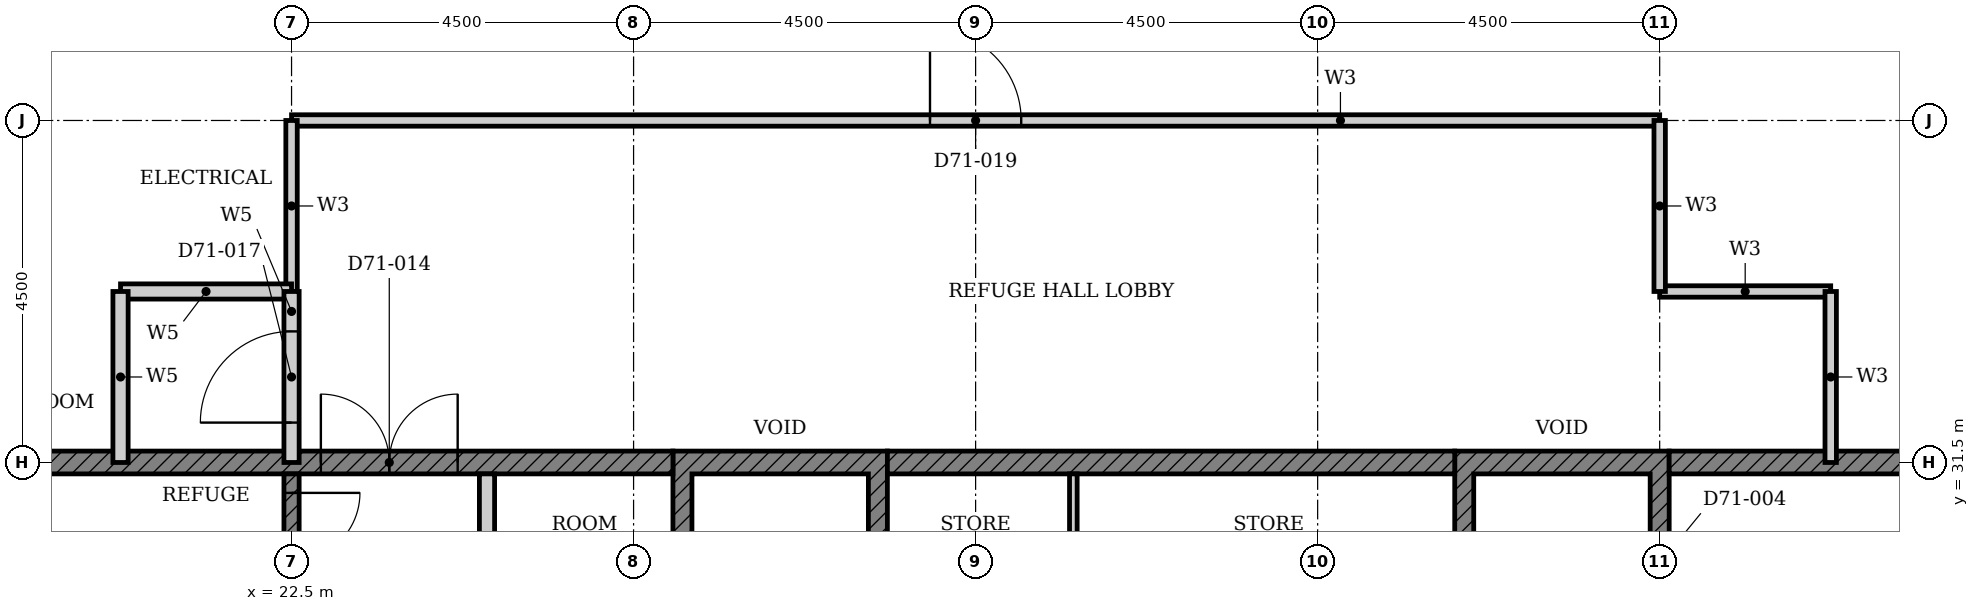
"""IFC4 building model, lengths in metres.
Left out: names, types, materials, properties, quantities, classifications, styles, units other than length and angle.
Written with IfcOpenShell. Run it as: python <this file> out.ifc"""

import sys

from ifc_helpers import new_model, si_unit, direction, frame, frame_2d, origin, place, context, subcontext, project, spatial, polyline, rectangle, outline, extrude, element, fill, save


model = new_model("IFC4")
c1 = context("Model", 3, precision=1e-05, world=origin(), true_north=direction((0.0, 1.0)))
c2 = subcontext(c1, "Body", "Model", "MODEL_VIEW")
j1 = project(units=[si_unit("LENGTHUNIT", "METRE"), si_unit("PLANEANGLEUNIT", "RADIAN")], contexts=[c1])
p1 = place(None, origin())
s1 = spatial("IfcSite", under=j1, at=p1, CompositionType="ELEMENT")
p2 = place(p1, origin())
s2 = spatial("IfcBuilding", under=s1, at=p2, CompositionType="ELEMENT")
p3 = place(p2, frame((0.0, 0.0, 278.6)))
s3 = spatial("IfcBuildingStorey", under=s2, at=p3, CompositionType="ELEMENT", Elevation=278.6)
p4 = place(p3, origin())
e1 = element("IfcWall", 1, at=p4, inside=s3, PredefinedType="SHEAR", context=c2, shape_type="SweptSolid", body=[
    extrude(outline(polyline([(27.518, 28.725), (27.768, 28.725), (27.768, 31.35), (30.089, 31.35), (30.089, 28.725), (30.339, 28.725), (30.339, 31.65), (27.518, 31.65), (27.518, 28.725)])), origin(), (0.0, 0.0, 1.0), 4.5),
])
p5 = place(p3, origin())
e2 = element("IfcWall", 2, at=p5, inside=s3, PredefinedType="SHEAR", context=c2, shape_type="SweptSolid", body=[
    extrude(outline(polyline([(37.803, 28.725), (38.053, 28.725), (38.053, 31.35), (40.375, 31.35), (40.375, 28.725), (40.625, 28.725), (40.625, 31.65), (37.803, 31.65), (37.803, 28.725)])), origin(), (0.0, 0.0, 1.0), 4.5),
])
p6 = place(p3, frame((18.15, 31.5, 0.0), z_axis=(0.0, 0.0, 1.0), x_axis=(1.0, 0.0, 0.0)))
e3 = element("IfcWall", 3, at=p6, inside=s3, PredefinedType="SHEAR", context=c2, shape_type="SweptSolid", body=[
    extrude(rectangle(XDim=9.368, YDim=0.3, at=frame_2d((4.684, 0.0))), origin(), (0.0, 0.0, 1.0), 4.5),
])
p7 = place(p6, frame((4.736, 0.0, 0.0)))
e4 = element("IfcOpeningElement", 4, at=p7, cuts=e3, PredefinedType="OPENING", context=c2, shape_type="SweptSolid", body=[
    extrude(rectangle(XDim=1.8, YDim=2.1, at=frame_2d((0.9, 1.05))), frame((0.0, 0.16, 0.0), z_axis=(0.0, -1.0, 0.0), x_axis=(1.0, 0.0, 0.0)), (0.0, 0.0, 1.0), 0.32),
])
p8 = place(p3, frame((30.339, 31.5, 0.0), z_axis=(0.0, 0.0, 1.0), x_axis=(1.0, 0.0, 0.0)))
e5 = element("IfcWall", 5, at=p8, inside=s3, PredefinedType="SHEAR", context=c2, shape_type="SweptSolid", body=[
    extrude(rectangle(XDim=7.464, YDim=0.3, at=frame_2d((3.732, 0.0))), origin(), (0.0, 0.0, 1.0), 4.5),
])
p9 = place(p3, frame((40.625, 31.5, 0.0), z_axis=(0.0, 0.0, 1.0), x_axis=(1.0, 0.0, 0.0)))
e6 = element("IfcWall", 6, at=p9, inside=s3, PredefinedType="SHEAR", context=c2, shape_type="SweptSolid", body=[
    extrude(rectangle(XDim=4.225, YDim=0.3, at=frame_2d((2.113, 0.0))), origin(), (0.0, 0.0, 1.0), 4.5),
])
p10 = place(p3, frame((25.072, 28.725, 0.0), z_axis=(0.0, 0.0, 1.0), x_axis=(0.0, 1.0, 0.0)))
e7 = element("IfcWall", 7, at=p10, inside=s3, PredefinedType="PARTITIONING", context=c2, shape_type="SweptSolid", body=[
    extrude(rectangle(XDim=2.625, YDim=0.2, at=frame_2d((1.312, 0.0))), origin(), (0.0, 0.0, 1.0), 4.5),
])
p11 = place(p3, frame((32.786, 28.725, 0.0), z_axis=(0.0, 0.0, 1.0), x_axis=(0.0, 1.0, 0.0)))
e8 = element("IfcWall", 8, at=p11, inside=s3, PredefinedType="PARTITIONING", context=c2, shape_type="SweptSolid", body=[
    extrude(rectangle(XDim=2.625, YDim=0.1, at=frame_2d((1.312, 0.0))), origin(), (0.0, 0.0, 1.0), 4.5),
])
p12 = place(p3, frame((22.5, 31.35, 0.0), z_axis=(0.0, 0.0, 1.0), x_axis=(0.0, -1.0, 0.0)))
e9 = element("IfcWall", 9, at=p12, inside=s3, PredefinedType="SHEAR", context=c2, shape_type="SweptSolid", body=[
    extrude(rectangle(XDim=5.825, YDim=0.2, at=frame_2d((2.913, 0.0))), origin(), (0.0, 0.0, 1.0), 4.5),
])
p13 = place(p12, frame((0.25, 0.0, 0.0)))
e10 = element("IfcOpeningElement", 10, at=p13, cuts=e9, PredefinedType="OPENING", context=c2, shape_type="SweptSolid", body=[
    extrude(rectangle(XDim=1.8, YDim=2.1, at=frame_2d((0.9, 1.05))), frame((0.0, 0.11, 0.0), z_axis=(0.0, -1.0, 0.0), x_axis=(1.0, 0.0, 0.0)), (0.0, 0.0, 1.0), 0.22),
])
p14 = place(p3, frame((40.5, 33.75, 0.0), z_axis=(0.0, 0.0, 1.0), x_axis=(1.0, 0.0, 0.0)))
e11 = element("IfcWall", 11, at=p14, inside=s3, PredefinedType="PARTITIONING", context=c2, shape_type="SweptSolid", body=[
    extrude(rectangle(XDim=2.25, YDim=0.15, at=frame_2d((1.125, 0.0))), origin(), (0.0, 0.0, 1.0), 4.5),
])
p15 = place(p3, frame((22.5, 36.0, 0.0), z_axis=(0.0, 0.0, 1.0), x_axis=(1.0, 0.0, 0.0)))
e12 = element("IfcWall", 12, at=p15, inside=s3, PredefinedType="PARTITIONING", context=c2, shape_type="SweptSolid", body=[
    extrude(rectangle(XDim=18.0, YDim=0.15, at=frame_2d((9.0, 0.0))), origin(), (0.0, 0.0, 1.0), 4.5),
])
p16 = place(p15, frame((8.4, 0.0, 0.0)))
e13 = element("IfcOpeningElement", 13, at=p16, cuts=e12, PredefinedType="OPENING", context=c2, shape_type="SweptSolid", body=[
    extrude(rectangle(XDim=1.2, YDim=2.1, at=frame_2d((0.6, 1.05))), frame((0.0, 0.085, 0.0), z_axis=(0.0, -1.0, 0.0), x_axis=(1.0, 0.0, 0.0)), (0.0, 0.0, 1.0), 0.17),
])
for number, where, z_axis, x_axis in (
    (14, (22.5, 33.75, 0.0), (0.0, 0.0, 1.0), (0.0, 1.0, 0.0)),
    (15, (40.5, 33.75, 0.0), (0.0, 0.0, 1.0), (0.0, 1.0, 0.0)),
    (16, (42.75, 31.5, 0.0), (0.0, 0.0, 1.0), (0.0, 1.0, 0.0)),
):
    element("IfcWall", number, at=place(p3, frame(where, z_axis=z_axis, x_axis=x_axis)), inside=s3, PredefinedType="PARTITIONING", context=c2, shape_type="SweptSolid", body=[
        extrude(rectangle(XDim=2.25, YDim=0.15, at=frame_2d((1.125, 0.0))), origin(), (0.0, 0.0, 1.0), 4.5),
    ])
for number, where, z_axis, x_axis in (
    (17, (20.25, 33.75, 0.0), (0.0, 0.0, 1.0), (1.0, 0.0, 0.0)),
    (18, (20.25, 31.5, 0.0), (0.0, 0.0, 1.0), (0.0, 1.0, 0.0)),
):
    element("IfcWall", number, at=place(p3, frame(where, z_axis=z_axis, x_axis=x_axis)), inside=s3, PredefinedType="PARTITIONING", context=c2, shape_type="SweptSolid", body=[
        extrude(rectangle(XDim=2.25, YDim=0.2, at=frame_2d((1.125, 0.0))), origin(), (0.0, 0.0, 1.0), 4.5),
    ])
p17 = place(p3, frame((22.5, 31.5, 0.0), z_axis=(0.0, 0.0, 1.0), x_axis=(0.0, 1.0, 0.0)))
e19 = element("IfcWall", 19, at=p17, inside=s3, PredefinedType="PARTITIONING", context=c2, shape_type="SweptSolid", body=[
    extrude(rectangle(XDim=2.25, YDim=0.2, at=frame_2d((1.125, 0.0))), origin(), (0.0, 0.0, 1.0), 4.5),
])
p18 = place(p17, frame((0.525, 0.0, 0.0)))
e20 = element("IfcOpeningElement", 20, at=p18, cuts=e19, PredefinedType="OPENING", context=c2, shape_type="SweptSolid", body=[
    extrude(rectangle(XDim=1.2, YDim=2.1, at=frame_2d((0.6, 1.05))), frame((0.0, 0.11, 0.0), z_axis=(0.0, -1.0, 0.0), x_axis=(1.0, 0.0, 0.0)), (0.0, 0.0, 1.0), 0.22),
])
p19 = place(p13, origin())
e21 = element("IfcDoor", 21, at=p19, inside=s3, OperationType="DOUBLE_DOOR_SINGLE_SWING", PredefinedType="DOOR", context=c2, shape_type="SweptSolid", body=[
    extrude(rectangle(XDim=1.8, YDim=2.1, at=frame_2d((0.9, 1.05))), frame((0.0, 0.025, 0.0), z_axis=(0.0, -1.0, 0.0), x_axis=(1.0, 0.0, 0.0)), (0.0, 0.0, 1.0), 0.05),
])
fill(e10, e21)
p20 = place(p7, origin())
e22 = element("IfcDoor", 22, at=p20, inside=s3, OperationType="DOUBLE_DOOR_SINGLE_SWING", PredefinedType="DOOR", context=c2, shape_type="SweptSolid", body=[
    extrude(rectangle(XDim=1.8, YDim=2.1, at=frame_2d((0.9, 1.05))), frame((0.0, 0.025, 0.0), z_axis=(0.0, -1.0, 0.0), x_axis=(1.0, 0.0, 0.0)), (0.0, 0.0, 1.0), 0.05),
])
fill(e4, e22)
p21 = place(p18, origin())
e23 = element("IfcDoor", 23, at=p21, inside=s3, OperationType="SINGLE_SWING_RIGHT", PredefinedType="DOOR", context=c2, shape_type="SweptSolid", body=[
    extrude(rectangle(XDim=1.2, YDim=2.1, at=frame_2d((0.6, 1.05))), frame((0.0, 0.025, 0.0), z_axis=(0.0, -1.0, 0.0), x_axis=(1.0, 0.0, 0.0)), (0.0, 0.0, 1.0), 0.05),
])
fill(e20, e23)
p22 = place(p16, origin())
e24 = element("IfcDoor", 24, at=p22, inside=s3, OperationType="SINGLE_SWING_LEFT", PredefinedType="DOOR", context=c2, shape_type="SweptSolid", body=[
    extrude(rectangle(XDim=1.2, YDim=2.1, at=frame_2d((0.6, 1.05))), frame((0.0, 0.025, 0.0), z_axis=(0.0, -1.0, 0.0), x_axis=(1.0, 0.0, 0.0)), (0.0, 0.0, 1.0), 0.05),
])
fill(e13, e24)
save(model, sys.argv[1])
